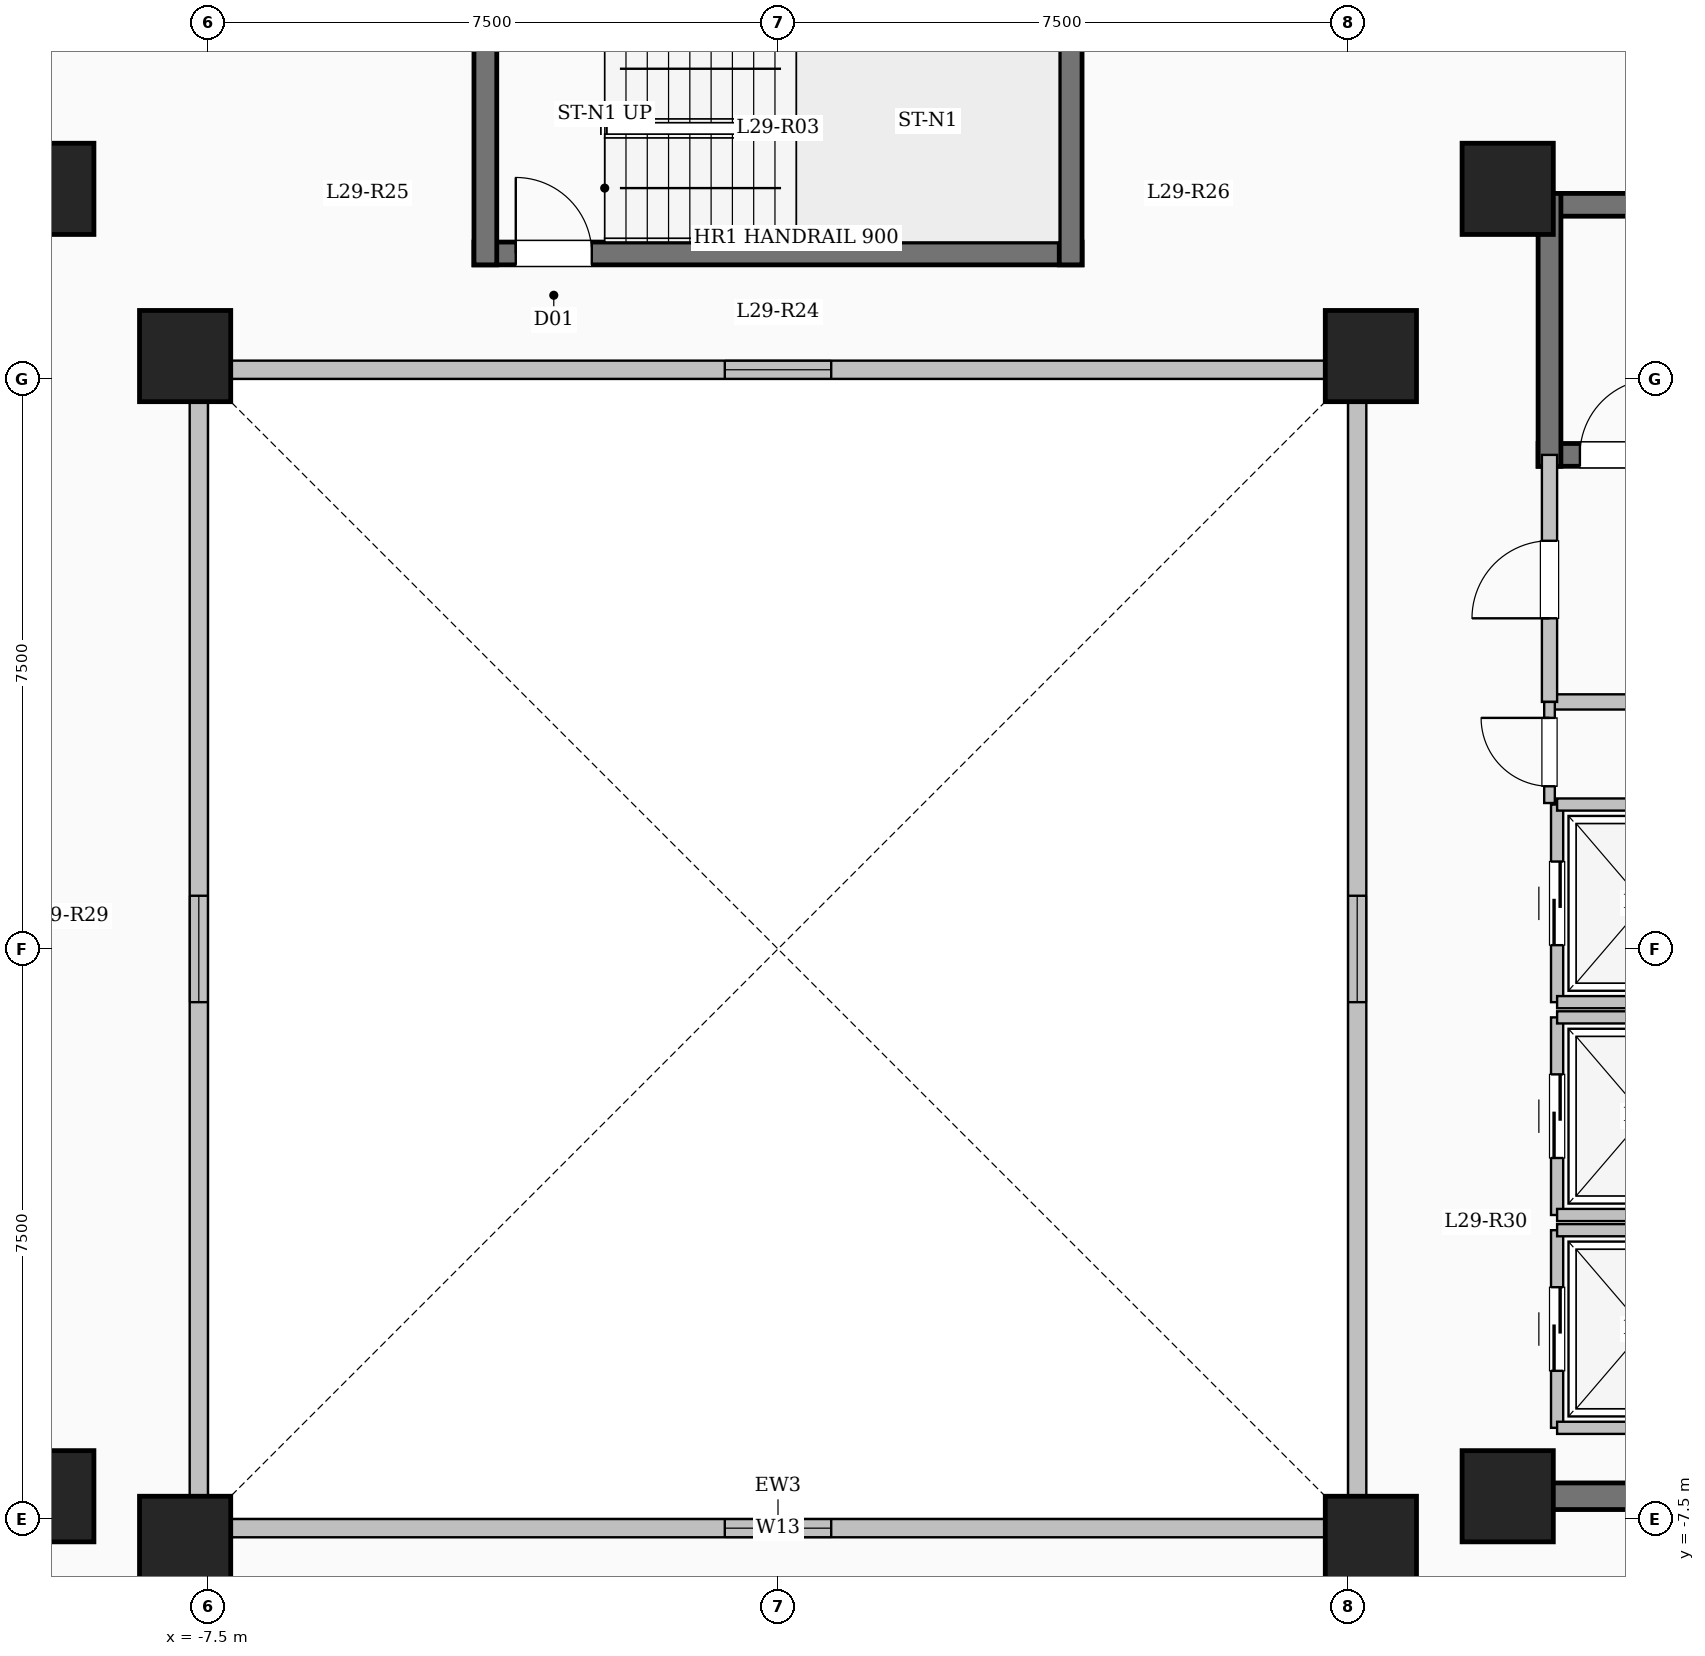
"""IFC4 building model, lengths in metres.
Left out: names, types, materials, properties, quantities, classifications, styles, units other than length and angle.
Written with IfcOpenShell. Run it as: python <this file> out.ifc"""

import sys

from ifc_helpers import new_model, si_unit, direction, frame, frame_2d, origin, origin_2d, place, context, subcontext, project, spatial, rectangle, extrude, element, fill, save


model = new_model("IFC4")
c1 = context("Model", 3, precision=1e-05, world=origin(), true_north=direction((0.0, 1.0)))
c2 = subcontext(c1, "Body", "Model", "MODEL_VIEW")
j1 = project(units=[si_unit("LENGTHUNIT", "METRE"), si_unit("PLANEANGLEUNIT", "RADIAN")], contexts=[c1])
p1 = place(None, origin())
s1 = spatial("IfcSite", under=j1, at=p1, CompositionType="ELEMENT")
p2 = place(p1, origin())
s2 = spatial("IfcBuilding", under=s1, at=p2, CompositionType="ELEMENT")
p3 = place(p2, frame((0.0, 0.0, 108.45)))
s3 = spatial("IfcBuildingStorey", under=s2, at=p3, CompositionType="ELEMENT", Elevation=108.45)
for number, where, z_axis, x_axis in (
    (1, (-7.8, -7.8, 0.0), (0.0, 0.0, 1.0), (1.0, 0.0, 0.0)),
    (2, (7.8, -7.8, 0.0), (0.0, 0.0, 1.0), (1.0, 0.0, 0.0)),
    (3, (-7.8, 7.8, 0.0), (0.0, 0.0, 1.0), (1.0, 0.0, 0.0)),
    (4, (7.8, 7.8, 0.0), (0.0, 0.0, 1.0), (1.0, 0.0, 0.0)),
    (5, (-9.6, -7.2, 0.0), (0.0, 0.0, 1.0), (1.0, 0.0, 0.0)),
    (6, (-9.6, 10.0, 0.0), (0.0, 0.0, 1.0), (1.0, 0.0, 0.0)),
    (7, (9.6, -7.2, 0.0), (0.0, 0.0, 1.0), (1.0, 0.0, 0.0)),
    (8, (9.6, 10.0, 0.0), (0.0, 0.0, 1.0), (1.0, 0.0, 0.0)),
):
    element("IfcColumn", number, at=place(p3, frame(where, z_axis=z_axis, x_axis=x_axis)), inside=s3, PredefinedType="COLUMN", context=c2, shape_type="SweptSolid", body=[
        extrude(rectangle(XDim=1.2, YDim=1.2, at=origin_2d()), origin(), (0.0, 0.0, 1.0), 3.35),
    ])
p4 = place(p3, frame((-7.62, -7.62, 0.0), z_axis=(0.0, 0.0, 1.0), x_axis=(1.0, 0.0, 0.0)))
e9 = element("IfcWall", 9, at=p4, inside=s3, PredefinedType="SOLIDWALL", context=c2, shape_type="SweptSolid", body=[
    extrude(rectangle(XDim=15.24, YDim=0.24, at=frame_2d((7.62, 0.0))), origin(), (0.0, 0.0, 1.0), 3.1),
])
p5 = place(p4, frame((6.92, 0.0, 0.95)))
e10 = element("IfcOpeningElement", 10, at=p5, cuts=e9, PredefinedType="OPENING", context=c2, shape_type="SweptSolid", body=[
    extrude(rectangle(XDim=1.4, YDim=1.5, at=frame_2d((0.7, 0.75))), frame((0.0, 0.13, 0.0), z_axis=(0.0, -1.0, 0.0), x_axis=(1.0, 0.0, 0.0)), (0.0, 0.0, 1.0), 0.26),
])
p6 = place(p3, frame((7.62, -7.62, 0.0), z_axis=(0.0, 0.0, 1.0), x_axis=(0.0, 1.0, 0.0)))
e11 = element("IfcWall", 11, at=p6, inside=s3, PredefinedType="SOLIDWALL", context=c2, shape_type="SweptSolid", body=[
    extrude(rectangle(XDim=15.24, YDim=0.24, at=frame_2d((7.62, 0.0))), origin(), (0.0, 0.0, 1.0), 3.1),
])
p7 = place(p6, frame((6.92, 0.0, 0.95)))
e12 = element("IfcOpeningElement", 12, at=p7, cuts=e11, PredefinedType="OPENING", context=c2, shape_type="SweptSolid", body=[
    extrude(rectangle(XDim=1.4, YDim=1.5, at=frame_2d((0.7, 0.75))), frame((0.0, 0.13, 0.0), z_axis=(0.0, -1.0, 0.0), x_axis=(1.0, 0.0, 0.0)), (0.0, 0.0, 1.0), 0.26),
])
p8 = place(p3, frame((7.62, 7.62, 0.0), z_axis=(0.0, 0.0, 1.0), x_axis=(-1.0, 0.0, 0.0)))
e13 = element("IfcWall", 13, at=p8, inside=s3, PredefinedType="SOLIDWALL", context=c2, shape_type="SweptSolid", body=[
    extrude(rectangle(XDim=15.24, YDim=0.24, at=frame_2d((7.62, 0.0))), origin(), (0.0, 0.0, 1.0), 3.1),
])
p9 = place(p8, frame((6.92, 0.0, 0.95)))
e14 = element("IfcOpeningElement", 14, at=p9, cuts=e13, PredefinedType="OPENING", context=c2, shape_type="SweptSolid", body=[
    extrude(rectangle(XDim=1.4, YDim=1.5, at=frame_2d((0.7, 0.75))), frame((0.0, 0.13, 0.0), z_axis=(0.0, -1.0, 0.0), x_axis=(1.0, 0.0, 0.0)), (0.0, 0.0, 1.0), 0.26),
])
p10 = place(p3, frame((-7.62, 7.62, 0.0), z_axis=(0.0, 0.0, 1.0), x_axis=(0.0, -1.0, 0.0)))
e15 = element("IfcWall", 15, at=p10, inside=s3, PredefinedType="SOLIDWALL", context=c2, shape_type="SweptSolid", body=[
    extrude(rectangle(XDim=15.24, YDim=0.24, at=frame_2d((7.62, 0.0))), origin(), (0.0, 0.0, 1.0), 3.1),
])
p11 = place(p10, frame((6.92, 0.0, 0.95)))
e16 = element("IfcOpeningElement", 16, at=p11, cuts=e15, PredefinedType="OPENING", context=c2, shape_type="SweptSolid", body=[
    extrude(rectangle(XDim=1.4, YDim=1.5, at=frame_2d((0.7, 0.75))), frame((0.0, 0.13, 0.0), z_axis=(0.0, -1.0, 0.0), x_axis=(1.0, 0.0, 0.0)), (0.0, 0.0, 1.0), 0.26),
])
p12 = place(p3, frame((10.0, 9.79, 0.0), z_axis=(0.0, 0.0, 1.0), x_axis=(1.0, 0.0, 0.0)))
e17 = element("IfcWall", 17, at=p12, inside=s3, PredefinedType="SHEAR", context=c2, shape_type="SweptSolid", body=[
    extrude(rectangle(XDim=8.0, YDim=0.3, at=frame_2d((4.0, 0.0))), origin(), (0.0, 0.0, 1.0), 3.35),
])
p13 = place(p3, frame((10.0, 6.5, 0.0), z_axis=(0.0, 0.0, 1.0), x_axis=(1.0, 0.0, 0.0)))
e18 = element("IfcWall", 18, at=p13, inside=s3, PredefinedType="SHEAR", context=c2, shape_type="SweptSolid", body=[
    extrude(rectangle(XDim=8.0, YDim=0.3, at=frame_2d((4.0, 0.0))), origin(), (0.0, 0.0, 1.0), 3.35),
])
p14 = place(p13, frame((0.55, 0.0, 0.0)))
e19 = element("IfcOpeningElement", 19, at=p14, cuts=e18, PredefinedType="OPENING", context=c2, shape_type="SweptSolid", body=[
    extrude(rectangle(XDim=1.0, YDim=2.15, at=frame_2d((0.5, 1.075))), frame((0.0, 0.16, 0.0), z_axis=(0.0, -1.0, 0.0), x_axis=(1.0, 0.0, 0.0)), (0.0, 0.0, 1.0), 0.32),
])
p15 = place(p3, frame((10.15, 6.35, 0.0), z_axis=(0.0, 0.0, 1.0), x_axis=(0.0, 1.0, 0.0)))
e20 = element("IfcWall", 20, at=p15, inside=s3, PredefinedType="SHEAR", context=c2, shape_type="SweptSolid", body=[
    extrude(rectangle(XDim=3.59, YDim=0.3, at=frame_2d((1.795, 0.0))), origin(), (0.0, 0.0, 1.0), 3.35),
])
p16 = place(p3, frame((-4.0, 9.15, 0.0), z_axis=(0.0, 0.0, 1.0), x_axis=(1.0, 0.0, 0.0)))
e21 = element("IfcWall", 21, at=p16, inside=s3, PredefinedType="SHEAR", context=c2, shape_type="SweptSolid", body=[
    extrude(rectangle(XDim=8.0, YDim=0.3, at=frame_2d((4.0, 0.0))), origin(), (0.0, 0.0, 1.0), 3.35),
])
p17 = place(p16, frame((0.55, 0.0, 0.0)))
e22 = element("IfcOpeningElement", 22, at=p17, cuts=e21, PredefinedType="OPENING", context=c2, shape_type="SweptSolid", body=[
    extrude(rectangle(XDim=1.0, YDim=2.15, at=frame_2d((0.5, 1.075))), frame((0.0, 0.16, 0.0), z_axis=(0.0, -1.0, 0.0), x_axis=(1.0, 0.0, 0.0)), (0.0, 0.0, 1.0), 0.32),
])
for number, where, z_axis, x_axis in (
    (23, (-3.85, 9.0, 0.0), (0.0, 0.0, 1.0), (0.0, 1.0, 0.0)),
    (24, (3.85, 9.0, 0.0), (0.0, 0.0, 1.0), (0.0, 1.0, 0.0)),
):
    element("IfcWall", number, at=place(p3, frame(where, z_axis=z_axis, x_axis=x_axis)), inside=s3, PredefinedType="SHEAR", context=c2, shape_type="SweptSolid", body=[
        extrude(rectangle(XDim=3.59, YDim=0.3, at=frame_2d((1.795, 0.0))), origin(), (0.0, 0.0, 1.0), 3.35),
    ])
p18 = place(p3, frame((10.15, 3.25, 0.0), z_axis=(0.0, 0.0, 1.0), x_axis=(1.0, 0.0, 0.0)))
e25 = element("IfcWall", 25, at=p18, inside=s3, PredefinedType="SOLIDWALL", context=c2, shape_type="SweptSolid", body=[
    extrude(rectangle(XDim=5.4, YDim=0.2, at=frame_2d((2.7, 0.0))), origin(), (0.0, 0.0, 1.0), 3.1),
])
p19 = place(p3, frame((10.15, 3.25, 0.0), z_axis=(0.0, 0.0, 1.0), x_axis=(0.0, 1.0, 0.0)))
e26 = element("IfcWall", 26, at=p19, inside=s3, PredefinedType="SOLIDWALL", context=c2, shape_type="SweptSolid", body=[
    extrude(rectangle(XDim=3.25, YDim=0.2, at=frame_2d((1.625, 0.0))), origin(), (0.0, 0.0, 1.0), 3.1),
])
p20 = place(p19, frame((1.1, 0.0, 0.0)))
e27 = element("IfcOpeningElement", 27, at=p20, cuts=e26, PredefinedType="OPENING", context=c2, shape_type="SweptSolid", body=[
    extrude(rectangle(XDim=1.02, YDim=2.15, at=frame_2d((0.51, 1.075))), frame((0.0, 0.11, 0.0), z_axis=(0.0, -1.0, 0.0), x_axis=(1.0, 0.0, 0.0)), (0.0, 0.0, 1.0), 0.22),
])
p21 = place(p3, frame((10.25, -6.3, 0.0), z_axis=(0.0, 0.0, 1.0), x_axis=(0.0, 1.0, 0.0)))
e28 = element("IfcWall", 28, at=p21, inside=s3, PredefinedType="SOLIDWALL", context=c2, shape_type="SweptSolid", body=[
    extrude(rectangle(XDim=2.6, YDim=0.16, at=frame_2d((1.3, 0.0))), origin(), (0.0, 0.0, 1.0), 3.1),
])
p22 = place(p21, frame((0.75, 0.0, 0.0)))
e29 = element("IfcOpeningElement", 29, at=p22, cuts=e28, PredefinedType="OPENING", context=c2, shape_type="SweptSolid", body=[
    extrude(rectangle(XDim=1.1, YDim=2.15, at=frame_2d((0.55, 1.075))), frame((0.0, 0.09, 0.0), z_axis=(0.0, -1.0, 0.0), x_axis=(1.0, 0.0, 0.0)), (0.0, 0.0, 1.0), 0.18),
])
for number, where, z_axis, x_axis in (
    (30, (10.25, -6.3, 0.0), (0.0, 0.0, 1.0), (1.0, 0.0, 0.0)),
    (31, (10.25, -3.7, 0.0), (0.0, 0.0, 1.0), (1.0, 0.0, 0.0)),
):
    element("IfcWall", number, at=place(p3, frame(where, z_axis=z_axis, x_axis=x_axis)), inside=s3, PredefinedType="SOLIDWALL", context=c2, shape_type="SweptSolid", body=[
        extrude(rectangle(XDim=2.3, YDim=0.16, at=frame_2d((1.15, 0.0))), origin(), (0.0, 0.0, 1.0), 3.1),
    ])
p23 = place(p3, frame((10.25, -3.5, 0.0), z_axis=(0.0, 0.0, 1.0), x_axis=(0.0, 1.0, 0.0)))
e32 = element("IfcWall", 32, at=p23, inside=s3, PredefinedType="SOLIDWALL", context=c2, shape_type="SweptSolid", body=[
    extrude(rectangle(XDim=2.6, YDim=0.16, at=frame_2d((1.3, 0.0))), origin(), (0.0, 0.0, 1.0), 3.1),
])
p24 = place(p23, frame((0.75, 0.0, 0.0)))
e33 = element("IfcOpeningElement", 33, at=p24, cuts=e32, PredefinedType="OPENING", context=c2, shape_type="SweptSolid", body=[
    extrude(rectangle(XDim=1.1, YDim=2.15, at=frame_2d((0.55, 1.075))), frame((0.0, 0.09, 0.0), z_axis=(0.0, -1.0, 0.0), x_axis=(1.0, 0.0, 0.0)), (0.0, 0.0, 1.0), 0.18),
])
for number, where, z_axis, x_axis in (
    (34, (10.25, -3.5, 0.0), (0.0, 0.0, 1.0), (1.0, 0.0, 0.0)),
    (35, (10.25, -0.9, 0.0), (0.0, 0.0, 1.0), (1.0, 0.0, 0.0)),
):
    element("IfcWall", number, at=place(p3, frame(where, z_axis=z_axis, x_axis=x_axis)), inside=s3, PredefinedType="SOLIDWALL", context=c2, shape_type="SweptSolid", body=[
        extrude(rectangle(XDim=2.3, YDim=0.16, at=frame_2d((1.15, 0.0))), origin(), (0.0, 0.0, 1.0), 3.1),
    ])
p25 = place(p3, frame((10.25, -0.7, 0.0), z_axis=(0.0, 0.0, 1.0), x_axis=(0.0, 1.0, 0.0)))
e36 = element("IfcWall", 36, at=p25, inside=s3, PredefinedType="SOLIDWALL", context=c2, shape_type="SweptSolid", body=[
    extrude(rectangle(XDim=2.6, YDim=0.16, at=frame_2d((1.3, 0.0))), origin(), (0.0, 0.0, 1.0), 3.1),
])
p26 = place(p25, frame((0.75, 0.0, 0.0)))
e37 = element("IfcOpeningElement", 37, at=p26, cuts=e36, PredefinedType="OPENING", context=c2, shape_type="SweptSolid", body=[
    extrude(rectangle(XDim=1.1, YDim=2.15, at=frame_2d((0.55, 1.075))), frame((0.0, 0.09, 0.0), z_axis=(0.0, -1.0, 0.0), x_axis=(1.0, 0.0, 0.0)), (0.0, 0.0, 1.0), 0.18),
])
for number, where, z_axis, x_axis in (
    (38, (10.25, -0.7, 0.0), (0.0, 0.0, 1.0), (1.0, 0.0, 0.0)),
    (39, (10.25, 1.9, 0.0), (0.0, 0.0, 1.0), (1.0, 0.0, 0.0)),
):
    element("IfcWall", number, at=place(p3, frame(where, z_axis=z_axis, x_axis=x_axis)), inside=s3, PredefinedType="SOLIDWALL", context=c2, shape_type="SweptSolid", body=[
        extrude(rectangle(XDim=2.3, YDim=0.16, at=frame_2d((1.15, 0.0))), origin(), (0.0, 0.0, 1.0), 3.1),
    ])
p27 = place(p3, frame((10.075, -7.2, 0.0), z_axis=(0.0, 0.0, 1.0), x_axis=(1.0, 0.0, 0.0)))
e40 = element("IfcWall", 40, at=p27, inside=s3, PredefinedType="SHEAR", context=c2, shape_type="SweptSolid", body=[
    extrude(rectangle(XDim=8.55, YDim=0.35, at=frame_2d((4.275, 0.0))), origin(), (0.0, 0.0, 1.0), 3.35),
])
p28 = place(p3, frame((10.15, 1.92, 0.0), z_axis=(0.0, 0.0, 1.0), x_axis=(0.0, 1.0, 0.0)))
e41 = element("IfcWall", 41, at=p28, inside=s3, PredefinedType="PARTITIONING", context=c2, shape_type="SweptSolid", body=[
    extrude(rectangle(XDim=1.33, YDim=0.14, at=frame_2d((0.665, 0.0))), origin(), (0.0, 0.0, 1.0), 3.1),
])
p29 = place(p28, frame((0.22, 0.0, 0.0)))
e42 = element("IfcOpeningElement", 42, at=p29, cuts=e41, PredefinedType="OPENING", context=c2, shape_type="SweptSolid", body=[
    extrude(rectangle(XDim=0.9, YDim=2.08, at=frame_2d((0.45, 1.04))), frame((0.0, 0.08, 0.0), z_axis=(0.0, -1.0, 0.0), x_axis=(1.0, 0.0, 0.0)), (0.0, 0.0, 1.0), 0.16),
])
p30 = place(p5, origin())
e43 = element("IfcWindow", 43, at=p30, inside=s3, PartitioningType="SINGLE_PANEL", PredefinedType="WINDOW", context=c2, shape_type="SweptSolid", body=[
    extrude(rectangle(XDim=1.4, YDim=1.5, at=frame_2d((0.7, 0.75))), frame((0.0, 0.03, 0.0), z_axis=(0.0, -1.0, 0.0), x_axis=(1.0, 0.0, 0.0)), (0.0, 0.0, 1.0), 0.06),
])
fill(e10, e43)
p31 = place(p7, origin())
e44 = element("IfcWindow", 44, at=p31, inside=s3, PartitioningType="SINGLE_PANEL", PredefinedType="WINDOW", context=c2, shape_type="SweptSolid", body=[
    extrude(rectangle(XDim=1.4, YDim=1.5, at=frame_2d((0.7, 0.75))), frame((0.0, 0.03, 0.0), z_axis=(0.0, -1.0, 0.0), x_axis=(1.0, 0.0, 0.0)), (0.0, 0.0, 1.0), 0.06),
])
fill(e12, e44)
p32 = place(p9, origin())
e45 = element("IfcWindow", 45, at=p32, inside=s3, PartitioningType="SINGLE_PANEL", PredefinedType="WINDOW", context=c2, shape_type="SweptSolid", body=[
    extrude(rectangle(XDim=1.4, YDim=1.5, at=frame_2d((0.7, 0.75))), frame((0.0, 0.03, 0.0), z_axis=(0.0, -1.0, 0.0), x_axis=(1.0, 0.0, 0.0)), (0.0, 0.0, 1.0), 0.06),
])
fill(e14, e45)
p33 = place(p11, origin())
e46 = element("IfcWindow", 46, at=p33, inside=s3, PartitioningType="SINGLE_PANEL", PredefinedType="WINDOW", context=c2, shape_type="SweptSolid", body=[
    extrude(rectangle(XDim=1.4, YDim=1.5, at=frame_2d((0.7, 0.75))), frame((0.0, 0.03, 0.0), z_axis=(0.0, -1.0, 0.0), x_axis=(1.0, 0.0, 0.0)), (0.0, 0.0, 1.0), 0.06),
])
fill(e16, e46)
p34 = place(p14, origin())
e47 = element("IfcDoor", 47, at=p34, inside=s3, OperationType="SINGLE_SWING_RIGHT", PredefinedType="DOOR", context=c2, shape_type="SweptSolid", body=[
    extrude(rectangle(XDim=1.0, YDim=2.15, at=frame_2d((0.5, 1.075))), frame((0.0, 0.025, 0.0), z_axis=(0.0, -1.0, 0.0), x_axis=(1.0, 0.0, 0.0)), (0.0, 0.0, 1.0), 0.05),
])
fill(e19, e47)
p35 = place(p17, origin())
e48 = element("IfcDoor", 48, at=p35, inside=s3, OperationType="SINGLE_SWING_LEFT", PredefinedType="DOOR", context=c2, shape_type="SweptSolid", body=[
    extrude(rectangle(XDim=1.0, YDim=2.15, at=frame_2d((0.5, 1.075))), frame((0.0, 0.025, 0.0), z_axis=(0.0, -1.0, 0.0), x_axis=(1.0, 0.0, 0.0)), (0.0, 0.0, 1.0), 0.05),
])
fill(e22, e48)
p36 = place(p20, origin())
e49 = element("IfcDoor", 49, at=p36, inside=s3, OperationType="SINGLE_SWING_LEFT", PredefinedType="DOOR", context=c2, shape_type="SweptSolid", body=[
    extrude(rectangle(XDim=1.02, YDim=2.15, at=frame_2d((0.51, 1.075))), frame((0.0, 0.025, 0.0), z_axis=(0.0, -1.0, 0.0), x_axis=(1.0, 0.0, 0.0)), (0.0, 0.0, 1.0), 0.05),
])
fill(e27, e49)
p37 = place(p22, origin())
e50 = element("IfcDoor", 50, at=p37, inside=s3, OperationType="SLIDING_TO_LEFT", PredefinedType="DOOR", context=c2, shape_type="SweptSolid", body=[
    extrude(rectangle(XDim=1.1, YDim=2.15, at=frame_2d((0.55, 1.075))), frame((0.0, 0.025, 0.0), z_axis=(0.0, -1.0, 0.0), x_axis=(1.0, 0.0, 0.0)), (0.0, 0.0, 1.0), 0.05),
])
fill(e29, e50)
p38 = place(p24, origin())
e51 = element("IfcDoor", 51, at=p38, inside=s3, OperationType="SLIDING_TO_LEFT", PredefinedType="DOOR", context=c2, shape_type="SweptSolid", body=[
    extrude(rectangle(XDim=1.1, YDim=2.15, at=frame_2d((0.55, 1.075))), frame((0.0, 0.025, 0.0), z_axis=(0.0, -1.0, 0.0), x_axis=(1.0, 0.0, 0.0)), (0.0, 0.0, 1.0), 0.05),
])
fill(e33, e51)
p39 = place(p26, origin())
e52 = element("IfcDoor", 52, at=p39, inside=s3, OperationType="SLIDING_TO_LEFT", PredefinedType="DOOR", context=c2, shape_type="SweptSolid", body=[
    extrude(rectangle(XDim=1.1, YDim=2.15, at=frame_2d((0.55, 1.075))), frame((0.0, 0.025, 0.0), z_axis=(0.0, -1.0, 0.0), x_axis=(1.0, 0.0, 0.0)), (0.0, 0.0, 1.0), 0.05),
])
fill(e37, e52)
p40 = place(p29, origin())
e53 = element("IfcDoor", 53, at=p40, inside=s3, OperationType="SINGLE_SWING_RIGHT", PredefinedType="DOOR", context=c2, shape_type="SweptSolid", body=[
    extrude(rectangle(XDim=0.9, YDim=2.08, at=frame_2d((0.45, 1.04))), frame((0.0, 0.025, 0.0), z_axis=(0.0, -1.0, 0.0), x_axis=(1.0, 0.0, 0.0)), (0.0, 0.0, 1.0), 0.05),
])
fill(e42, e53)
save(model, sys.argv[1])
